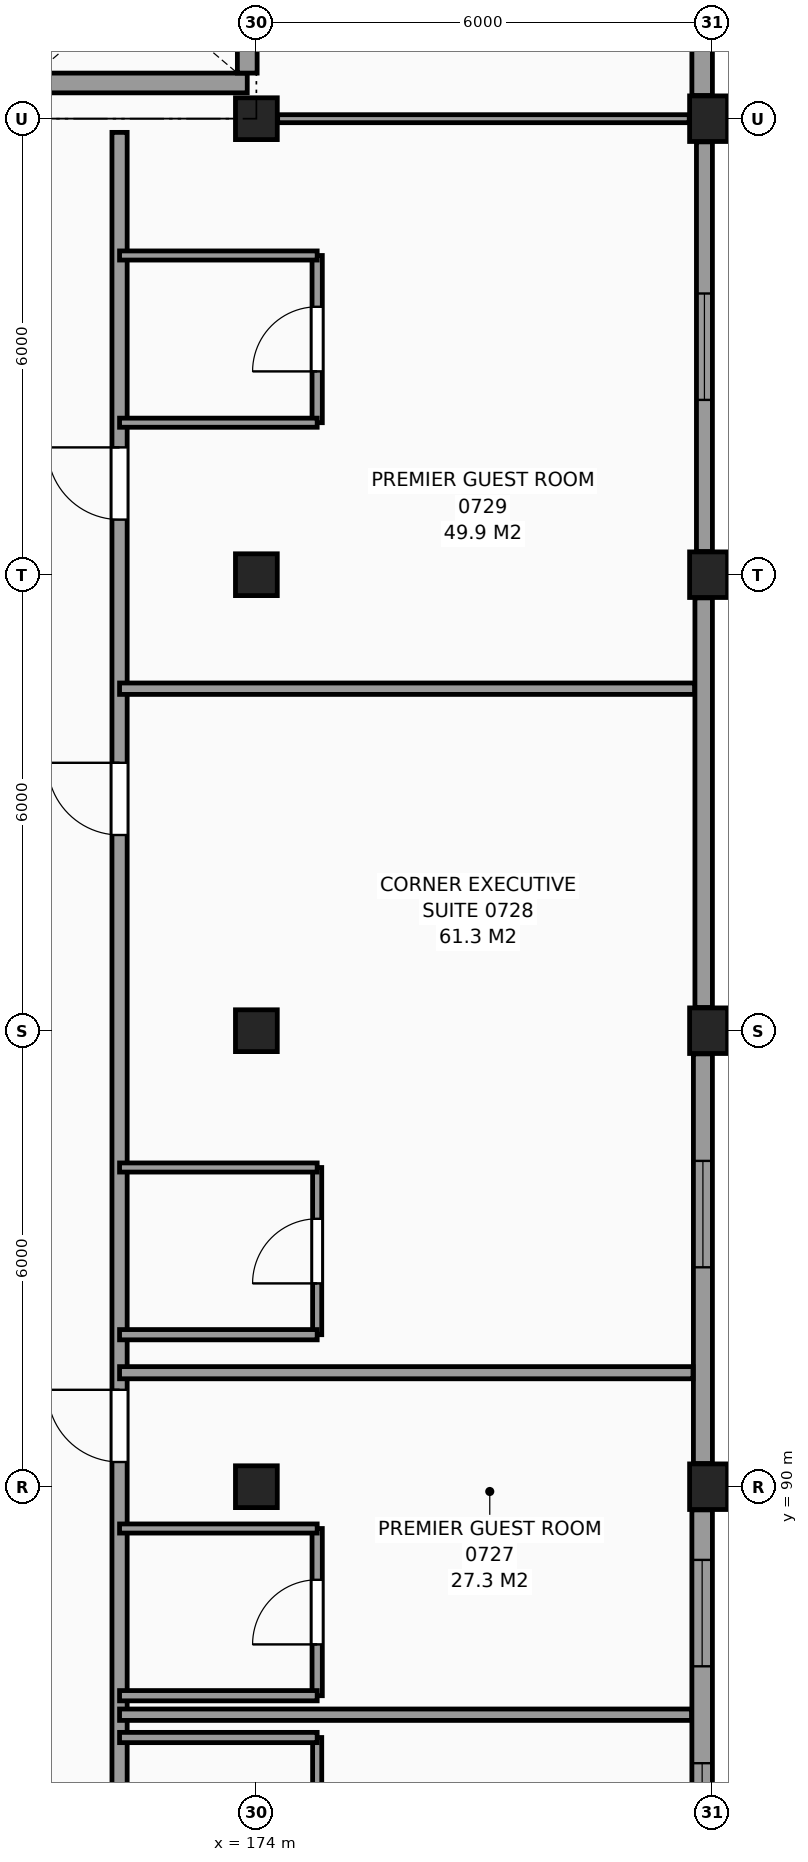
"""IFC4 building model, lengths in metres.
Left out: names, types, materials, properties, quantities, classifications, styles, units other than length and angle.
Written with IfcOpenShell. Run it as: python <this file> out.ifc"""

import sys

from ifc_helpers import new_model, si_unit, direction, frame, frame_2d, origin, origin_2d, place, context, subcontext, project, spatial, rectangle, extrude, element, fill, save


model = new_model("IFC4")
c1 = context("Model", 3, precision=1e-05, world=origin(), true_north=direction((0.0, 1.0)))
c2 = subcontext(c1, "Body", "Model", "MODEL_VIEW")
j1 = project(units=[si_unit("LENGTHUNIT", "METRE"), si_unit("PLANEANGLEUNIT", "RADIAN")], contexts=[c1])
p1 = place(None, origin())
s1 = spatial("IfcSite", under=j1, at=p1, CompositionType="ELEMENT")
p2 = place(p1, origin())
s2 = spatial("IfcBuilding", under=s1, at=p2, CompositionType="ELEMENT")
p3 = place(p2, frame((0.0, 0.0, 31.5)))
s3 = spatial("IfcBuildingStorey", under=s2, at=p3, CompositionType="ELEMENT", Elevation=31.5)
for number, where, z_axis, x_axis in (
    (1, (174.0, 90.0, 0.0), (0.0, 0.0, 1.0), (1.0, 0.0, 0.0)),
    (2, (174.0, 96.0, 0.0), (0.0, 0.0, 1.0), (1.0, 0.0, 0.0)),
    (3, (174.0, 102.0, 0.0), (0.0, 0.0, 1.0), (1.0, 0.0, 0.0)),
    (4, (174.0, 108.0, 0.0), (0.0, 0.0, 1.0), (1.0, 0.0, 0.0)),
):
    element("IfcColumn", number, at=place(p3, frame(where, z_axis=z_axis, x_axis=x_axis)), inside=s3, PredefinedType="COLUMN", context=c2, shape_type="SweptSolid", body=[
        extrude(rectangle(XDim=0.55, YDim=0.55, at=origin_2d()), origin(), (0.0, 0.0, 1.0), 3.3),
    ])
for number, where, z_axis, x_axis in (
    (5, (180.0, 90.0, 0.0), (0.0, 0.0, 1.0), (1.0, 0.0, 0.0)),
    (6, (180.0, 96.0, 0.0), (0.0, 0.0, 1.0), (1.0, 0.0, 0.0)),
    (7, (180.0, 102.0, 0.0), (0.0, 0.0, 1.0), (1.0, 0.0, 0.0)),
    (8, (180.0, 108.0, 0.0), (0.0, 0.0, 1.0), (1.0, 0.0, 0.0)),
):
    element("IfcColumn", number, at=place(p3, frame(where, z_axis=z_axis, x_axis=x_axis)), inside=s3, PredefinedType="COLUMN", context=c2, shape_type="SweptSolid", body=[
        extrude(rectangle(XDim=0.6, YDim=0.6, at=origin_2d()), origin(), (0.0, 0.0, 1.0), 3.3),
    ])
p4 = place(p3, frame((179.865, 84.305, 0.0), z_axis=(0.0, 0.0, 1.0), x_axis=(0.0, 1.0, 0.0)))
e9 = element("IfcWall", 9, at=p4, inside=s3, PredefinedType="SOLIDWALL", context=c2, shape_type="SweptSolid", body=[
    extrude(rectangle(XDim=5.39, YDim=0.27, at=frame_2d((2.695, 0.0))), origin(), (0.0, 0.0, 1.0), 2.42),
])
p5 = place(p4, frame((0.657, 0.0, 0.8)))
e10 = element("IfcOpeningElement", 10, at=p5, cuts=e9, PredefinedType="OPENING", context=c2, shape_type="SweptSolid", body=[
    extrude(rectangle(XDim=1.4, YDim=1.4, at=frame_2d((0.7, 0.7))), frame((0.0, 0.145, 0.0), z_axis=(0.0, -1.0, 0.0), x_axis=(1.0, 0.0, 0.0)), (0.0, 0.0, 1.0), 0.29),
])
p6 = place(p4, frame((3.332, 0.0, 0.8)))
e11 = element("IfcOpeningElement", 11, at=p6, cuts=e9, PredefinedType="OPENING", context=c2, shape_type="SweptSolid", body=[
    extrude(rectangle(XDim=1.4, YDim=1.4, at=frame_2d((0.7, 0.7))), frame((0.0, 0.145, 0.0), z_axis=(0.0, -1.0, 0.0), x_axis=(1.0, 0.0, 0.0)), (0.0, 0.0, 1.0), 0.29),
])
p7 = place(p3, frame((179.875, 90.305, 0.0), z_axis=(0.0, 0.0, 1.0), x_axis=(0.0, 1.0, 0.0)))
e12 = element("IfcWall", 12, at=p7, inside=s3, PredefinedType="SOLIDWALL", context=c2, shape_type="SweptSolid", body=[
    extrude(rectangle(XDim=5.39, YDim=0.25, at=frame_2d((2.695, 0.0))), origin(), (0.0, 0.0, 1.0), 2.42),
])
p8 = place(p7, frame((2.582, 0.0, 0.8)))
e13 = element("IfcOpeningElement", 13, at=p8, cuts=e12, PredefinedType="OPENING", context=c2, shape_type="SweptSolid", body=[
    extrude(rectangle(XDim=1.4, YDim=1.4, at=frame_2d((0.7, 0.7))), frame((0.0, 0.135, 0.0), z_axis=(0.0, -1.0, 0.0), x_axis=(1.0, 0.0, 0.0)), (0.0, 0.0, 1.0), 0.27),
])
p9 = place(p3, frame((179.885, 96.305, 0.0), z_axis=(0.0, 0.0, 1.0), x_axis=(0.0, 1.0, 0.0)))
e14 = element("IfcWall", 14, at=p9, inside=s3, PredefinedType="SOLIDWALL", context=c2, shape_type="SweptSolid", body=[
    extrude(rectangle(XDim=5.39, YDim=0.23, at=frame_2d((2.695, 0.0))), origin(), (0.0, 0.0, 1.0), 2.42),
])
p10 = place(p3, frame((179.895, 102.305, 0.0), z_axis=(0.0, 0.0, 1.0), x_axis=(0.0, 1.0, 0.0)))
e15 = element("IfcWall", 15, at=p10, inside=s3, PredefinedType="SOLIDWALL", context=c2, shape_type="SweptSolid", body=[
    extrude(rectangle(XDim=5.39, YDim=0.21, at=frame_2d((2.695, 0.0))), origin(), (0.0, 0.0, 1.0), 2.42),
])
p11 = place(p10, frame((1.995, 0.0, 0.8)))
e16 = element("IfcOpeningElement", 16, at=p11, cuts=e15, PredefinedType="OPENING", context=c2, shape_type="SweptSolid", body=[
    extrude(rectangle(XDim=1.4, YDim=1.4, at=frame_2d((0.7, 0.7))), frame((0.0, 0.115, 0.0), z_axis=(0.0, -1.0, 0.0), x_axis=(1.0, 0.0, 0.0)), (0.0, 0.0, 1.0), 0.23),
])
p12 = place(p3, frame((179.865, 108.305, 0.0), z_axis=(0.0, 0.0, 1.0), x_axis=(0.0, 1.0, 0.0)))
e17 = element("IfcWall", 17, at=p12, inside=s3, PredefinedType="SOLIDWALL", context=c2, shape_type="SweptSolid", body=[
    extrude(rectangle(XDim=5.39, YDim=0.27, at=frame_2d((2.695, 0.0))), origin(), (0.0, 0.0, 1.0), 2.42),
])
p13 = place(p3, frame((170.97, 108.47, 0.0), z_axis=(0.0, 0.0, 1.0), x_axis=(1.0, 0.0, 0.0)))
e18 = element("IfcWall", 18, at=p13, inside=s3, PredefinedType="SHEAR", context=c2, shape_type="SweptSolid", body=[
    extrude(rectangle(XDim=2.91, YDim=0.26, at=frame_2d((1.455, 0.0))), origin(), (0.0, 0.0, 1.0), 3.3),
])
p14 = place(p3, frame((173.88, 108.6, 0.0), z_axis=(0.0, 0.0, 1.0), x_axis=(0.0, 1.0, 0.0)))
e19 = element("IfcWall", 19, at=p14, inside=s3, PredefinedType="SHEAR", context=c2, shape_type="SweptSolid", body=[
    extrude(rectangle(XDim=2.25, YDim=0.26, at=frame_2d((1.125, 0.0))), origin(), (0.0, 0.0, 1.0), 3.3),
])
p15 = place(p3, frame((172.2, 42.255, 0.0), z_axis=(0.0, 0.0, 1.0), x_axis=(0.0, 1.0, 0.0)))
e20 = element("IfcWall", 20, at=p15, inside=s3, PredefinedType="PARTITIONING", context=c2, shape_type="SweptSolid", body=[
    extrude(rectangle(XDim=65.565, YDim=0.2, at=frame_2d((32.783, 0.0))), origin(), (0.0, 0.0, 1.0), 3.07),
])
p16 = place(p15, frame((0.42, 0.0, 0.0)))
e21 = element("IfcOpeningElement", 21, at=p16, cuts=e20, PredefinedType="OPENING", context=c2, shape_type="SweptSolid", body=[
    extrude(rectangle(XDim=0.95, YDim=2.1, at=frame_2d((0.475, 1.05))), frame((0.0, 0.11, 0.0), z_axis=(0.0, -1.0, 0.0), x_axis=(1.0, 0.0, 0.0)), (0.0, 0.0, 1.0), 0.22),
])
p17 = place(p15, frame((6.47, 0.0, 0.0)))
e22 = element("IfcOpeningElement", 22, at=p17, cuts=e20, PredefinedType="OPENING", context=c2, shape_type="SweptSolid", body=[
    extrude(rectangle(XDim=0.95, YDim=2.1, at=frame_2d((0.475, 1.05))), frame((0.0, 0.11, 0.0), z_axis=(0.0, -1.0, 0.0), x_axis=(1.0, 0.0, 0.0)), (0.0, 0.0, 1.0), 0.22),
])
p18 = place(p15, frame((16.27, 0.0, 0.0)))
e23 = element("IfcOpeningElement", 23, at=p18, cuts=e20, PredefinedType="OPENING", context=c2, shape_type="SweptSolid", body=[
    extrude(rectangle(XDim=0.95, YDim=2.1, at=frame_2d((0.475, 1.05))), frame((0.0, 0.11, 0.0), z_axis=(0.0, -1.0, 0.0), x_axis=(1.0, 0.0, 0.0)), (0.0, 0.0, 1.0), 0.22),
])
p19 = place(p15, frame((18.47, 0.0, 0.0)))
e24 = element("IfcOpeningElement", 24, at=p19, cuts=e20, PredefinedType="OPENING", context=c2, shape_type="SweptSolid", body=[
    extrude(rectangle(XDim=0.95, YDim=2.1, at=frame_2d((0.475, 1.05))), frame((0.0, 0.11, 0.0), z_axis=(0.0, -1.0, 0.0), x_axis=(1.0, 0.0, 0.0)), (0.0, 0.0, 1.0), 0.22),
])
p20 = place(p15, frame((22.87, 0.0, 0.0)))
e25 = element("IfcOpeningElement", 25, at=p20, cuts=e20, PredefinedType="OPENING", context=c2, shape_type="SweptSolid", body=[
    extrude(rectangle(XDim=0.95, YDim=2.1, at=frame_2d((0.475, 1.05))), frame((0.0, 0.11, 0.0), z_axis=(0.0, -1.0, 0.0), x_axis=(1.0, 0.0, 0.0)), (0.0, 0.0, 1.0), 0.22),
])
p21 = place(p15, frame((27.37, 0.0, 0.0)))
e26 = element("IfcOpeningElement", 26, at=p21, cuts=e20, PredefinedType="OPENING", context=c2, shape_type="SweptSolid", body=[
    extrude(rectangle(XDim=0.95, YDim=2.1, at=frame_2d((0.475, 1.05))), frame((0.0, 0.11, 0.0), z_axis=(0.0, -1.0, 0.0), x_axis=(1.0, 0.0, 0.0)), (0.0, 0.0, 1.0), 0.22),
])
p22 = place(p15, frame((36.47, 0.0, 0.0)))
e27 = element("IfcOpeningElement", 27, at=p22, cuts=e20, PredefinedType="OPENING", context=c2, shape_type="SweptSolid", body=[
    extrude(rectangle(XDim=0.95, YDim=2.1, at=frame_2d((0.475, 1.05))), frame((0.0, 0.11, 0.0), z_axis=(0.0, -1.0, 0.0), x_axis=(1.0, 0.0, 0.0)), (0.0, 0.0, 1.0), 0.22),
])
p23 = place(p15, frame((40.87, 0.0, 0.0)))
e28 = element("IfcOpeningElement", 28, at=p23, cuts=e20, PredefinedType="OPENING", context=c2, shape_type="SweptSolid", body=[
    extrude(rectangle(XDim=0.95, YDim=2.1, at=frame_2d((0.475, 1.05))), frame((0.0, 0.11, 0.0), z_axis=(0.0, -1.0, 0.0), x_axis=(1.0, 0.0, 0.0)), (0.0, 0.0, 1.0), 0.22),
])
p24 = place(p15, frame((48.07, 0.0, 0.0)))
e29 = element("IfcOpeningElement", 29, at=p24, cuts=e20, PredefinedType="OPENING", context=c2, shape_type="SweptSolid", body=[
    extrude(rectangle(XDim=0.95, YDim=2.1, at=frame_2d((0.475, 1.05))), frame((0.0, 0.11, 0.0), z_axis=(0.0, -1.0, 0.0), x_axis=(1.0, 0.0, 0.0)), (0.0, 0.0, 1.0), 0.22),
])
p25 = place(p15, frame((56.32, 0.0, 0.0)))
e30 = element("IfcOpeningElement", 30, at=p25, cuts=e20, PredefinedType="OPENING", context=c2, shape_type="SweptSolid", body=[
    extrude(rectangle(XDim=0.95, YDim=2.1, at=frame_2d((0.475, 1.05))), frame((0.0, 0.11, 0.0), z_axis=(0.0, -1.0, 0.0), x_axis=(1.0, 0.0, 0.0)), (0.0, 0.0, 1.0), 0.22),
])
p26 = place(p15, frame((60.47, 0.0, 0.0)))
e31 = element("IfcOpeningElement", 31, at=p26, cuts=e20, PredefinedType="OPENING", context=c2, shape_type="SweptSolid", body=[
    extrude(rectangle(XDim=0.95, YDim=2.1, at=frame_2d((0.475, 1.05))), frame((0.0, 0.11, 0.0), z_axis=(0.0, -1.0, 0.0), x_axis=(1.0, 0.0, 0.0)), (0.0, 0.0, 1.0), 0.22),
])
p27 = place(p3, frame((174.8, 84.5, 0.0), z_axis=(0.0, 0.0, 1.0), x_axis=(0.0, 1.0, 0.0)))
e32 = element("IfcWall", 32, at=p27, inside=s3, PredefinedType="PARTITIONING", context=c2, shape_type="SweptSolid", body=[
    extrude(rectangle(XDim=2.2, YDim=0.12, at=frame_2d((1.1, 0.0))), origin(), (0.0, 0.0, 1.0), 3.07),
])
p28 = place(p27, frame((0.675, 0.0, 0.0)))
e33 = element("IfcOpeningElement", 33, at=p28, cuts=e32, PredefinedType="OPENING", context=c2, shape_type="SweptSolid", body=[
    extrude(rectangle(XDim=0.85, YDim=2.1, at=frame_2d((0.425, 1.05))), frame((0.0, 0.07, 0.0), z_axis=(0.0, -1.0, 0.0), x_axis=(1.0, 0.0, 0.0)), (0.0, 0.0, 1.0), 0.14),
])
p29 = place(p3, frame((174.8, 87.25, 0.0), z_axis=(0.0, 0.0, 1.0), x_axis=(0.0, 1.0, 0.0)))
e34 = element("IfcWall", 34, at=p29, inside=s3, PredefinedType="PARTITIONING", context=c2, shape_type="SweptSolid", body=[
    extrude(rectangle(XDim=2.2, YDim=0.135, at=frame_2d((1.1, 0.0))), origin(), (0.0, 0.0, 1.0), 3.07),
])
p30 = place(p29, frame((0.675, 0.0, 0.0)))
e35 = element("IfcOpeningElement", 35, at=p30, cuts=e34, PredefinedType="OPENING", context=c2, shape_type="SweptSolid", body=[
    extrude(rectangle(XDim=0.85, YDim=2.1, at=frame_2d((0.425, 1.05))), frame((0.0, 0.078, 0.0), z_axis=(0.0, -1.0, 0.0), x_axis=(1.0, 0.0, 0.0)), (0.0, 0.0, 1.0), 0.155),
])
p31 = place(p3, frame((174.8, 92.0, 0.0), z_axis=(0.0, 0.0, 1.0), x_axis=(0.0, 1.0, 0.0)))
e36 = element("IfcWall", 36, at=p31, inside=s3, PredefinedType="PARTITIONING", context=c2, shape_type="SweptSolid", body=[
    extrude(rectangle(XDim=2.2, YDim=0.12, at=frame_2d((1.1, 0.0))), origin(), (0.0, 0.0, 1.0), 3.07),
])
p32 = place(p31, frame((0.675, 0.0, 0.0)))
e37 = element("IfcOpeningElement", 37, at=p32, cuts=e36, PredefinedType="OPENING", context=c2, shape_type="SweptSolid", body=[
    extrude(rectangle(XDim=0.85, YDim=2.1, at=frame_2d((0.425, 1.05))), frame((0.0, 0.07, 0.0), z_axis=(0.0, -1.0, 0.0), x_axis=(1.0, 0.0, 0.0)), (0.0, 0.0, 1.0), 0.14),
])
p33 = place(p3, frame((174.8, 104.0, 0.0), z_axis=(0.0, 0.0, 1.0), x_axis=(0.0, 1.0, 0.0)))
e38 = element("IfcWall", 38, at=p33, inside=s3, PredefinedType="PARTITIONING", context=c2, shape_type="SweptSolid", body=[
    extrude(rectangle(XDim=2.2, YDim=0.135, at=frame_2d((1.1, 0.0))), origin(), (0.0, 0.0, 1.0), 3.07),
])
p34 = place(p33, frame((0.675, 0.0, 0.0)))
e39 = element("IfcOpeningElement", 39, at=p34, cuts=e38, PredefinedType="OPENING", context=c2, shape_type="SweptSolid", body=[
    extrude(rectangle(XDim=0.85, YDim=2.1, at=frame_2d((0.425, 1.05))), frame((0.0, 0.078, 0.0), z_axis=(0.0, -1.0, 0.0), x_axis=(1.0, 0.0, 0.0)), (0.0, 0.0, 1.0), 0.155),
])
p35 = place(p3, frame((172.2, 86.7, 0.0), z_axis=(0.0, 0.0, 1.0), x_axis=(1.0, 0.0, 0.0)))
e40 = element("IfcWall", 40, at=p35, inside=s3, PredefinedType="PARTITIONING", context=c2, shape_type="SweptSolid", body=[
    extrude(rectangle(XDim=2.6, YDim=0.135, at=frame_2d((1.3, 0.0))), origin(), (0.0, 0.0, 1.0), 3.07),
])
p36 = place(p3, frame((172.2, 87.0, 0.0), z_axis=(0.0, 0.0, 1.0), x_axis=(1.0, 0.0, 0.0)))
e41 = element("IfcWall", 41, at=p36, inside=s3, PredefinedType="PARTITIONING", context=c2, shape_type="SweptSolid", body=[
    extrude(rectangle(XDim=7.525, YDim=0.15, at=frame_2d((3.763, 0.0))), origin(), (0.0, 0.0, 1.0), 3.07),
])
p37 = place(p3, frame((172.2, 87.25, 0.0), z_axis=(0.0, 0.0, 1.0), x_axis=(1.0, 0.0, 0.0)))
e42 = element("IfcWall", 42, at=p37, inside=s3, PredefinedType="PARTITIONING", context=c2, shape_type="SweptSolid", body=[
    extrude(rectangle(XDim=2.6, YDim=0.135, at=frame_2d((1.3, 0.0))), origin(), (0.0, 0.0, 1.0), 3.07),
])
p38 = place(p3, frame((172.2, 89.45, 0.0), z_axis=(0.0, 0.0, 1.0), x_axis=(1.0, 0.0, 0.0)))
e43 = element("IfcWall", 43, at=p38, inside=s3, PredefinedType="PARTITIONING", context=c2, shape_type="SweptSolid", body=[
    extrude(rectangle(XDim=2.6, YDim=0.12, at=frame_2d((1.3, 0.0))), origin(), (0.0, 0.0, 1.0), 3.07),
])
p39 = place(p3, frame((172.2, 91.5, 0.0), z_axis=(0.0, 0.0, 1.0), x_axis=(1.0, 0.0, 0.0)))
e44 = element("IfcWall", 44, at=p39, inside=s3, PredefinedType="PARTITIONING", context=c2, shape_type="SweptSolid", body=[
    extrude(rectangle(XDim=7.545, YDim=0.16, at=frame_2d((3.772, 0.0))), origin(), (0.0, 0.0, 1.0), 3.07),
])
p40 = place(p3, frame((172.2, 92.0, 0.0), z_axis=(0.0, 0.0, 1.0), x_axis=(1.0, 0.0, 0.0)))
e45 = element("IfcWall", 45, at=p40, inside=s3, PredefinedType="PARTITIONING", context=c2, shape_type="SweptSolid", body=[
    extrude(rectangle(XDim=2.6, YDim=0.135, at=frame_2d((1.3, 0.0))), origin(), (0.0, 0.0, 1.0), 3.07),
])
p41 = place(p3, frame((172.2, 94.2, 0.0), z_axis=(0.0, 0.0, 1.0), x_axis=(1.0, 0.0, 0.0)))
e46 = element("IfcWall", 46, at=p41, inside=s3, PredefinedType="PARTITIONING", context=c2, shape_type="SweptSolid", body=[
    extrude(rectangle(XDim=2.6, YDim=0.12, at=frame_2d((1.3, 0.0))), origin(), (0.0, 0.0, 1.0), 3.07),
])
p42 = place(p3, frame((172.2, 100.5, 0.0), z_axis=(0.0, 0.0, 1.0), x_axis=(1.0, 0.0, 0.0)))
e47 = element("IfcWall", 47, at=p42, inside=s3, PredefinedType="PARTITIONING", context=c2, shape_type="SweptSolid", body=[
    extrude(rectangle(XDim=7.565, YDim=0.15, at=frame_2d((3.782, 0.0))), origin(), (0.0, 0.0, 1.0), 3.07),
])
for number, where, z_axis, x_axis in (
    (48, (172.2, 104.0, 0.0), (0.0, 0.0, 1.0), (1.0, 0.0, 0.0)),
    (49, (172.2, 106.2, 0.0), (0.0, 0.0, 1.0), (1.0, 0.0, 0.0)),
):
    element("IfcWall", number, at=place(p3, frame(where, z_axis=z_axis, x_axis=x_axis)), inside=s3, PredefinedType="PARTITIONING", context=c2, shape_type="SweptSolid", body=[
        extrude(rectangle(XDim=2.6, YDim=0.12, at=frame_2d((1.3, 0.0))), origin(), (0.0, 0.0, 1.0), 3.07),
    ])
p43 = place(p3, frame((174.28, 108.0, 0.0), z_axis=(0.0, 0.0, 1.0), x_axis=(1.0, 0.0, 0.0)))
e50 = element("IfcWall", 50, at=p43, inside=s3, PredefinedType="PARTITIONING", context=c2, shape_type="SweptSolid", body=[
    extrude(rectangle(XDim=5.415, YDim=0.105, at=frame_2d((2.708, 0.0))), origin(), (0.0, 0.0, 1.0), 2.47),
])
p44 = place(p5, origin())
e51 = element("IfcWindow", 51, at=p44, inside=s3, PartitioningType="SINGLE_PANEL", PredefinedType="WINDOW", context=c2, shape_type="SweptSolid", body=[
    extrude(rectangle(XDim=1.4, YDim=1.4, at=frame_2d((0.7, 0.7))), frame((0.0, 0.03, 0.0), z_axis=(0.0, -1.0, 0.0), x_axis=(1.0, 0.0, 0.0)), (0.0, 0.0, 1.0), 0.06),
])
fill(e10, e51)
p45 = place(p6, origin())
e52 = element("IfcWindow", 52, at=p45, inside=s3, PartitioningType="SINGLE_PANEL", PredefinedType="WINDOW", context=c2, shape_type="SweptSolid", body=[
    extrude(rectangle(XDim=1.4, YDim=1.4, at=frame_2d((0.7, 0.7))), frame((0.0, 0.03, 0.0), z_axis=(0.0, -1.0, 0.0), x_axis=(1.0, 0.0, 0.0)), (0.0, 0.0, 1.0), 0.06),
])
fill(e11, e52)
p46 = place(p8, origin())
e53 = element("IfcWindow", 53, at=p46, inside=s3, PartitioningType="SINGLE_PANEL", PredefinedType="WINDOW", context=c2, shape_type="SweptSolid", body=[
    extrude(rectangle(XDim=1.4, YDim=1.4, at=frame_2d((0.7, 0.7))), frame((0.0, 0.03, 0.0), z_axis=(0.0, -1.0, 0.0), x_axis=(1.0, 0.0, 0.0)), (0.0, 0.0, 1.0), 0.06),
])
fill(e13, e53)
p47 = place(p11, origin())
e54 = element("IfcWindow", 54, at=p47, inside=s3, PartitioningType="SINGLE_PANEL", PredefinedType="WINDOW", context=c2, shape_type="SweptSolid", body=[
    extrude(rectangle(XDim=1.4, YDim=1.4, at=frame_2d((0.7, 0.7))), frame((0.0, 0.03, 0.0), z_axis=(0.0, -1.0, 0.0), x_axis=(1.0, 0.0, 0.0)), (0.0, 0.0, 1.0), 0.06),
])
fill(e16, e54)
p48 = place(p30, origin())
e55 = element("IfcDoor", 55, at=p48, inside=s3, OperationType="SINGLE_SWING_LEFT", PredefinedType="DOOR", context=c2, shape_type="SweptSolid", body=[
    extrude(rectangle(XDim=0.85, YDim=2.1, at=frame_2d((0.425, 1.05))), frame((0.0, 0.025, 0.0), z_axis=(0.0, -1.0, 0.0), x_axis=(1.0, 0.0, 0.0)), (0.0, 0.0, 1.0), 0.05),
])
fill(e35, e55)
p49 = place(p24, origin())
e56 = element("IfcDoor", 56, at=p49, inside=s3, OperationType="SINGLE_SWING_RIGHT", PredefinedType="DOOR", context=c2, shape_type="SweptSolid", body=[
    extrude(rectangle(XDim=0.95, YDim=2.1, at=frame_2d((0.475, 1.05))), frame((0.0, 0.025, 0.0), z_axis=(0.0, -1.0, 0.0), x_axis=(1.0, 0.0, 0.0)), (0.0, 0.0, 1.0), 0.05),
])
fill(e29, e56)
p50 = place(p32, origin())
e57 = element("IfcDoor", 57, at=p50, inside=s3, OperationType="SINGLE_SWING_LEFT", PredefinedType="DOOR", context=c2, shape_type="SweptSolid", body=[
    extrude(rectangle(XDim=0.85, YDim=2.1, at=frame_2d((0.425, 1.05))), frame((0.0, 0.025, 0.0), z_axis=(0.0, -1.0, 0.0), x_axis=(1.0, 0.0, 0.0)), (0.0, 0.0, 1.0), 0.05),
])
fill(e37, e57)
p51 = place(p25, origin())
e58 = element("IfcDoor", 58, at=p51, inside=s3, OperationType="SINGLE_SWING_RIGHT", PredefinedType="DOOR", context=c2, shape_type="SweptSolid", body=[
    extrude(rectangle(XDim=0.95, YDim=2.1, at=frame_2d((0.475, 1.05))), frame((0.0, 0.025, 0.0), z_axis=(0.0, -1.0, 0.0), x_axis=(1.0, 0.0, 0.0)), (0.0, 0.0, 1.0), 0.05),
])
fill(e30, e58)
p52 = place(p34, origin())
e59 = element("IfcDoor", 59, at=p52, inside=s3, OperationType="SINGLE_SWING_LEFT", PredefinedType="DOOR", context=c2, shape_type="SweptSolid", body=[
    extrude(rectangle(XDim=0.85, YDim=2.1, at=frame_2d((0.425, 1.05))), frame((0.0, 0.025, 0.0), z_axis=(0.0, -1.0, 0.0), x_axis=(1.0, 0.0, 0.0)), (0.0, 0.0, 1.0), 0.05),
])
fill(e39, e59)
p53 = place(p26, origin())
e60 = element("IfcDoor", 60, at=p53, inside=s3, OperationType="SINGLE_SWING_RIGHT", PredefinedType="DOOR", context=c2, shape_type="SweptSolid", body=[
    extrude(rectangle(XDim=0.95, YDim=2.1, at=frame_2d((0.475, 1.05))), frame((0.0, 0.025, 0.0), z_axis=(0.0, -1.0, 0.0), x_axis=(1.0, 0.0, 0.0)), (0.0, 0.0, 1.0), 0.05),
])
fill(e31, e60)
save(model, sys.argv[1])
